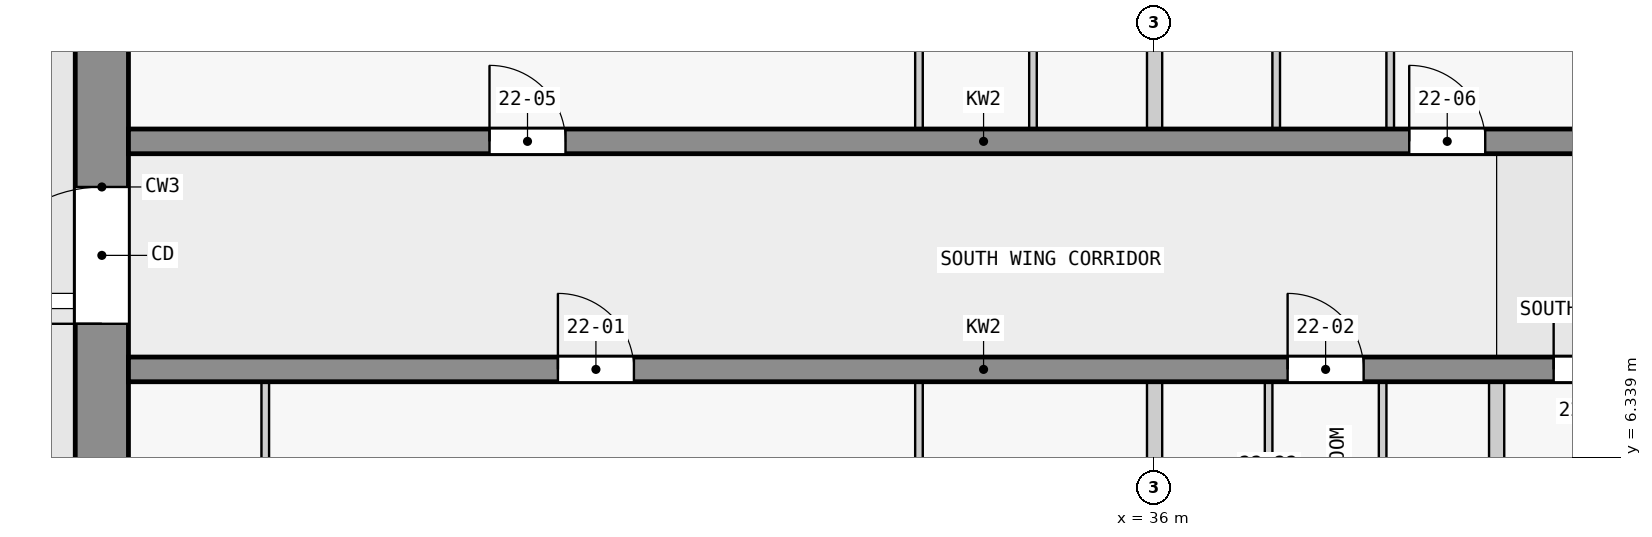
"""IFC4 building model, lengths in metres.
Left out: names, types, materials, properties, quantities, classifications, styles, units other than length and angle.
Written with IfcOpenShell. Run it as: python <this file> out.ifc"""

import sys

from ifc_helpers import new_model, si_unit, direction, frame, frame_2d, origin, place, context, subcontext, project, spatial, rectangle, extrude, element, fill, save


model = new_model("IFC4")
c1 = context("Model", 3, precision=1e-05, world=origin(), true_north=direction((0.0, 1.0)))
c2 = subcontext(c1, "Body", "Model", "MODEL_VIEW")
j1 = project(units=[si_unit("LENGTHUNIT", "METRE"), si_unit("PLANEANGLEUNIT", "RADIAN")], contexts=[c1])
p1 = place(None, origin())
s1 = spatial("IfcSite", under=j1, at=p1, CompositionType="ELEMENT")
p2 = place(p1, origin())
s2 = spatial("IfcBuilding", under=s1, at=p2, CompositionType="ELEMENT")
p3 = place(p2, frame((0.0, 0.0, 88.8)))
s3 = spatial("IfcBuildingStorey", under=s2, at=p3, CompositionType="ELEMENT", Elevation=88.8)
p4 = place(p3, frame((22.15, 2.5, 0.0), z_axis=(0.0, 0.0, 1.0), x_axis=(0.0, 1.0, 0.0)))
e1 = element("IfcWall", 1, at=p4, inside=s3, PredefinedType="SHEAR", context=c2, shape_type="SweptSolid", body=[
    extrude(rectangle(XDim=14.8, YDim=0.7, at=frame_2d((7.4, 0.0))), origin(), (0.0, 0.0, 1.0), 3.25),
])
p5 = place(p4, frame((5.6, 0.0, 0.0)))
e2 = element("IfcOpeningElement", 2, at=p5, cuts=e1, PredefinedType="OPENING", context=c2, shape_type="SweptSolid", body=[
    extrude(rectangle(XDim=1.8, YDim=2.1, at=frame_2d((0.9, 1.05))), frame((0.0, 0.36, 0.0), z_axis=(0.0, -1.0, 0.0), x_axis=(1.0, 0.0, 0.0)), (0.0, 0.0, 1.0), 0.72),
])
p6 = place(p3, frame((22.5, 7.5, 0.0), z_axis=(0.0, 0.0, 1.0), x_axis=(1.0, 0.0, 0.0)))
e3 = element("IfcWall", 3, at=p6, inside=s3, PredefinedType="SHEAR", context=c2, shape_type="SweptSolid", body=[
    extrude(rectangle(XDim=22.5, YDim=0.325, at=frame_2d((11.25, 0.0))), origin(), (0.0, 0.0, 1.0), 3.25),
])
p7 = place(p6, frame((5.65, 0.0, 0.0)))
e4 = element("IfcOpeningElement", 4, at=p7, cuts=e3, PredefinedType="OPENING", context=c2, shape_type="SweptSolid", body=[
    extrude(rectangle(XDim=1.0, YDim=2.1, at=frame_2d((0.5, 1.05))), frame((0.0, 0.172, 0.0), z_axis=(0.0, -1.0, 0.0), x_axis=(1.0, 0.0, 0.0)), (0.0, 0.0, 1.0), 0.345),
])
p8 = place(p6, frame((15.25, 0.0, 0.0)))
e5 = element("IfcOpeningElement", 5, at=p8, cuts=e3, PredefinedType="OPENING", context=c2, shape_type="SweptSolid", body=[
    extrude(rectangle(XDim=1.0, YDim=2.1, at=frame_2d((0.5, 1.05))), frame((0.0, 0.172, 0.0), z_axis=(0.0, -1.0, 0.0), x_axis=(1.0, 0.0, 0.0)), (0.0, 0.0, 1.0), 0.345),
])
p9 = place(p6, frame((18.75, 0.0, 0.0)))
e6 = element("IfcOpeningElement", 6, at=p9, cuts=e3, PredefinedType="OPENING", context=c2, shape_type="SweptSolid", body=[
    extrude(rectangle(XDim=0.9, YDim=2.1, at=frame_2d((0.45, 1.05))), frame((0.0, 0.172, 0.0), z_axis=(0.0, -1.0, 0.0), x_axis=(1.0, 0.0, 0.0)), (0.0, 0.0, 1.0), 0.345),
])
p10 = place(p6, frame((20.95, 0.0, 0.0)))
e7 = element("IfcOpeningElement", 7, at=p10, cuts=e3, PredefinedType="OPENING", context=c2, shape_type="SweptSolid", body=[
    extrude(rectangle(XDim=1.0, YDim=2.1, at=frame_2d((0.5, 1.05))), frame((0.0, 0.172, 0.0), z_axis=(0.0, -1.0, 0.0), x_axis=(1.0, 0.0, 0.0)), (0.0, 0.0, 1.0), 0.345),
])
p11 = place(p3, frame((22.5, 10.5, 0.0), z_axis=(0.0, 0.0, 1.0), x_axis=(1.0, 0.0, 0.0)))
e8 = element("IfcWall", 8, at=p11, inside=s3, PredefinedType="SHEAR", context=c2, shape_type="SweptSolid", body=[
    extrude(rectangle(XDim=22.5, YDim=0.325, at=frame_2d((11.25, 0.0))), origin(), (0.0, 0.0, 1.0), 3.25),
])
p12 = place(p11, frame((4.75, 0.0, 0.0)))
e9 = element("IfcOpeningElement", 9, at=p12, cuts=e8, PredefinedType="OPENING", context=c2, shape_type="SweptSolid", body=[
    extrude(rectangle(XDim=1.0, YDim=2.1, at=frame_2d((0.5, 1.05))), frame((0.0, 0.172, 0.0), z_axis=(0.0, -1.0, 0.0), x_axis=(1.0, 0.0, 0.0)), (0.0, 0.0, 1.0), 0.345),
])
p13 = place(p11, frame((16.85, 0.0, 0.0)))
e10 = element("IfcOpeningElement", 10, at=p13, cuts=e8, PredefinedType="OPENING", context=c2, shape_type="SweptSolid", body=[
    extrude(rectangle(XDim=1.0, YDim=2.1, at=frame_2d((0.5, 1.05))), frame((0.0, 0.172, 0.0), z_axis=(0.0, -1.0, 0.0), x_axis=(1.0, 0.0, 0.0)), (0.0, 0.0, 1.0), 0.345),
])
p14 = place(p3, frame((24.3, 3.938, 0.0), z_axis=(0.0, 0.0, 1.0), x_axis=(0.0, 1.0, 0.0)))
e11 = element("IfcWall", 11, at=p14, inside=s3, PredefinedType="PARTITIONING", context=c2, shape_type="SweptSolid", body=[
    extrude(rectangle(XDim=3.4, YDim=0.1, at=frame_2d((1.7, 0.0))), origin(), (0.0, 0.0, 1.0), 3.25),
])
p15 = place(p14, frame((1.25, 0.0, 0.0)))
e12 = element("IfcOpeningElement", 12, at=p15, cuts=e11, PredefinedType="OPENING", context=c2, shape_type="SweptSolid", body=[
    extrude(rectangle(XDim=0.9, YDim=2.1, at=frame_2d((0.45, 1.05))), frame((0.0, 0.06, 0.0), z_axis=(0.0, -1.0, 0.0), x_axis=(1.0, 0.0, 0.0)), (0.0, 0.0, 1.0), 0.12),
])
p16 = place(p3, frame((32.9, 7.337, 0.0), z_axis=(0.0, 0.0, 1.0), x_axis=(0.0, -1.0, 0.0)))
e13 = element("IfcWall", 13, at=p16, inside=s3, PredefinedType="PARTITIONING", context=c2, shape_type="SweptSolid", body=[
    extrude(rectangle(XDim=3.35, YDim=0.1, at=frame_2d((1.675, 0.0))), origin(), (0.0, 0.0, 1.0), 3.25),
])
p17 = place(p16, frame((1.25, 0.0, 0.0)))
e14 = element("IfcOpeningElement", 14, at=p17, cuts=e13, PredefinedType="OPENING", context=c2, shape_type="SweptSolid", body=[
    extrude(rectangle(XDim=0.9, YDim=2.1, at=frame_2d((0.45, 1.05))), frame((0.0, 0.06, 0.0), z_axis=(0.0, -1.0, 0.0), x_axis=(1.0, 0.0, 0.0)), (0.0, 0.0, 1.0), 0.12),
])
p18 = place(p3, frame((32.9, 14.012, 0.0), z_axis=(0.0, 0.0, 1.0), x_axis=(0.0, -1.0, 0.0)))
e15 = element("IfcWall", 15, at=p18, inside=s3, PredefinedType="PARTITIONING", context=c2, shape_type="SweptSolid", body=[
    extrude(rectangle(XDim=3.35, YDim=0.1, at=frame_2d((1.675, 0.0))), origin(), (0.0, 0.0, 1.0), 3.25),
])
p19 = place(p18, frame((1.25, 0.0, 0.0)))
e16 = element("IfcOpeningElement", 16, at=p19, cuts=e15, PredefinedType="OPENING", context=c2, shape_type="SweptSolid", body=[
    extrude(rectangle(XDim=0.9, YDim=2.1, at=frame_2d((0.45, 1.05))), frame((0.0, 0.06, 0.0), z_axis=(0.0, -1.0, 0.0), x_axis=(1.0, 0.0, 0.0)), (0.0, 0.0, 1.0), 0.12),
])
p20 = place(p3, frame((34.4, 10.663, 0.0), z_axis=(0.0, 0.0, 1.0), x_axis=(0.0, 1.0, 0.0)))
e17 = element("IfcWall", 17, at=p20, inside=s3, PredefinedType="PARTITIONING", context=c2, shape_type="SweptSolid", body=[
    extrude(rectangle(XDim=3.35, YDim=0.1, at=frame_2d((1.675, 0.0))), origin(), (0.0, 0.0, 1.0), 3.25),
])
p21 = place(p3, frame((36.0, 1.4, 0.0), z_axis=(0.0, 0.0, 1.0), x_axis=(0.0, 1.0, 0.0)))
e18 = element("IfcWall", 18, at=p21, inside=s3, PredefinedType="PARTITIONING", context=c2, shape_type="SweptSolid", body=[
    extrude(rectangle(XDim=5.938, YDim=0.2, at=frame_2d((2.969, 0.0))), origin(), (0.0, 0.0, 1.0), 3.25),
])
p22 = place(p3, frame((36.0, 10.663, 0.0), z_axis=(0.0, 0.0, 1.0), x_axis=(0.0, 1.0, 0.0)))
e19 = element("IfcWall", 19, at=p22, inside=s3, PredefinedType="PARTITIONING", context=c2, shape_type="SweptSolid", body=[
    extrude(rectangle(XDim=3.4, YDim=0.2, at=frame_2d((1.7, 0.0))), origin(), (0.0, 0.0, 1.0), 3.25),
])
p23 = place(p3, frame((37.5, 3.988, 0.0), z_axis=(0.0, 0.0, 1.0), x_axis=(0.0, 1.0, 0.0)))
e20 = element("IfcWall", 20, at=p23, inside=s3, PredefinedType="PARTITIONING", context=c2, shape_type="SweptSolid", body=[
    extrude(rectangle(XDim=3.35, YDim=0.1, at=frame_2d((1.675, 0.0))), origin(), (0.0, 0.0, 1.0), 3.25),
])
p24 = place(p23, frame((1.25, 0.0, 0.0)))
e21 = element("IfcOpeningElement", 21, at=p24, cuts=e20, PredefinedType="OPENING", context=c2, shape_type="SweptSolid", body=[
    extrude(rectangle(XDim=0.9, YDim=2.1, at=frame_2d((0.45, 1.05))), frame((0.0, 0.06, 0.0), z_axis=(0.0, -1.0, 0.0), x_axis=(1.0, 0.0, 0.0)), (0.0, 0.0, 1.0), 0.12),
])
p25 = place(p3, frame((37.6, 10.663, 0.0), z_axis=(0.0, 0.0, 1.0), x_axis=(0.0, 1.0, 0.0)))
e22 = element("IfcWall", 22, at=p25, inside=s3, PredefinedType="PARTITIONING", context=c2, shape_type="SweptSolid", body=[
    extrude(rectangle(XDim=3.35, YDim=0.1, at=frame_2d((1.675, 0.0))), origin(), (0.0, 0.0, 1.0), 3.25),
])
p26 = place(p3, frame((39.0, 7.337, 0.0), z_axis=(0.0, 0.0, 1.0), x_axis=(0.0, -1.0, 0.0)))
e23 = element("IfcWall", 23, at=p26, inside=s3, PredefinedType="PARTITIONING", context=c2, shape_type="SweptSolid", body=[
    extrude(rectangle(XDim=3.4, YDim=0.1, at=frame_2d((1.7, 0.0))), origin(), (0.0, 0.0, 1.0), 3.25),
])
p27 = place(p26, frame((1.25, 0.0, 0.0)))
e24 = element("IfcOpeningElement", 24, at=p27, cuts=e23, PredefinedType="OPENING", context=c2, shape_type="SweptSolid", body=[
    extrude(rectangle(XDim=0.9, YDim=2.1, at=frame_2d((0.45, 1.05))), frame((0.0, 0.06, 0.0), z_axis=(0.0, -1.0, 0.0), x_axis=(1.0, 0.0, 0.0)), (0.0, 0.0, 1.0), 0.12),
])
p28 = place(p3, frame((39.1, 10.663, 0.0), z_axis=(0.0, 0.0, 1.0), x_axis=(0.0, 1.0, 0.0)))
e25 = element("IfcWall", 25, at=p28, inside=s3, PredefinedType="PARTITIONING", context=c2, shape_type="SweptSolid", body=[
    extrude(rectangle(XDim=3.35, YDim=0.1, at=frame_2d((1.675, 0.0))), origin(), (0.0, 0.0, 1.0), 3.25),
])
p29 = place(p28, frame((1.25, 0.0, 0.0)))
e26 = element("IfcOpeningElement", 26, at=p29, cuts=e25, PredefinedType="OPENING", context=c2, shape_type="SweptSolid", body=[
    extrude(rectangle(XDim=0.9, YDim=2.1, at=frame_2d((0.45, 1.05))), frame((0.0, 0.06, 0.0), z_axis=(0.0, -1.0, 0.0), x_axis=(1.0, 0.0, 0.0)), (0.0, 0.0, 1.0), 0.12),
])
p30 = place(p3, frame((40.5, 3.938, 0.0), z_axis=(0.0, 0.0, 1.0), x_axis=(0.0, 1.0, 0.0)))
e27 = element("IfcWall", 27, at=p30, inside=s3, PredefinedType="PARTITIONING", context=c2, shape_type="SweptSolid", body=[
    extrude(rectangle(XDim=3.4, YDim=0.2, at=frame_2d((1.7, 0.0))), origin(), (0.0, 0.0, 1.0), 3.25),
])
p31 = place(p5, origin())
e28 = element("IfcDoor", 28, at=p31, inside=s3, OperationType="DOUBLE_DOOR_SINGLE_SWING", PredefinedType="DOOR", context=c2, shape_type="SweptSolid", body=[
    extrude(rectangle(XDim=1.8, YDim=2.1, at=frame_2d((0.9, 1.05))), frame((0.0, 0.025, 0.0), z_axis=(0.0, -1.0, 0.0), x_axis=(1.0, 0.0, 0.0)), (0.0, 0.0, 1.0), 0.05),
])
fill(e2, e28)
p32 = place(p7, origin())
e29 = element("IfcDoor", 29, at=p32, inside=s3, OperationType="SINGLE_SWING_LEFT", PredefinedType="DOOR", context=c2, shape_type="SweptSolid", body=[
    extrude(rectangle(XDim=1.0, YDim=2.1, at=frame_2d((0.5, 1.05))), frame((0.0, 0.025, 0.0), z_axis=(0.0, -1.0, 0.0), x_axis=(1.0, 0.0, 0.0)), (0.0, 0.0, 1.0), 0.05),
])
fill(e4, e29)
p33 = place(p8, origin())
e30 = element("IfcDoor", 30, at=p33, inside=s3, OperationType="SINGLE_SWING_RIGHT", PredefinedType="DOOR", context=c2, shape_type="SweptSolid", body=[
    extrude(rectangle(XDim=1.0, YDim=2.1, at=frame_2d((0.5, 1.05))), frame((0.0, 0.025, 0.0), z_axis=(0.0, -1.0, 0.0), x_axis=(1.0, 0.0, 0.0)), (0.0, 0.0, 1.0), 0.05),
])
fill(e5, e30)
p34 = place(p9, origin())
e31 = element("IfcDoor", 31, at=p34, inside=s3, OperationType="SINGLE_SWING_RIGHT", PredefinedType="DOOR", context=c2, shape_type="SweptSolid", body=[
    extrude(rectangle(XDim=0.9, YDim=2.1, at=frame_2d((0.45, 1.05))), frame((0.0, 0.025, 0.0), z_axis=(0.0, -1.0, 0.0), x_axis=(1.0, 0.0, 0.0)), (0.0, 0.0, 1.0), 0.05),
])
fill(e6, e31)
p35 = place(p12, origin())
e32 = element("IfcDoor", 32, at=p35, inside=s3, OperationType="SINGLE_SWING_LEFT", PredefinedType="DOOR", context=c2, shape_type="SweptSolid", body=[
    extrude(rectangle(XDim=1.0, YDim=2.1, at=frame_2d((0.5, 1.05))), frame((0.0, 0.025, 0.0), z_axis=(0.0, -1.0, 0.0), x_axis=(1.0, 0.0, 0.0)), (0.0, 0.0, 1.0), 0.05),
])
fill(e9, e32)
p36 = place(p13, origin())
e33 = element("IfcDoor", 33, at=p36, inside=s3, OperationType="SINGLE_SWING_RIGHT", PredefinedType="DOOR", context=c2, shape_type="SweptSolid", body=[
    extrude(rectangle(XDim=1.0, YDim=2.1, at=frame_2d((0.5, 1.05))), frame((0.0, 0.025, 0.0), z_axis=(0.0, -1.0, 0.0), x_axis=(1.0, 0.0, 0.0)), (0.0, 0.0, 1.0), 0.05),
])
fill(e10, e33)
save(model, sys.argv[1])
